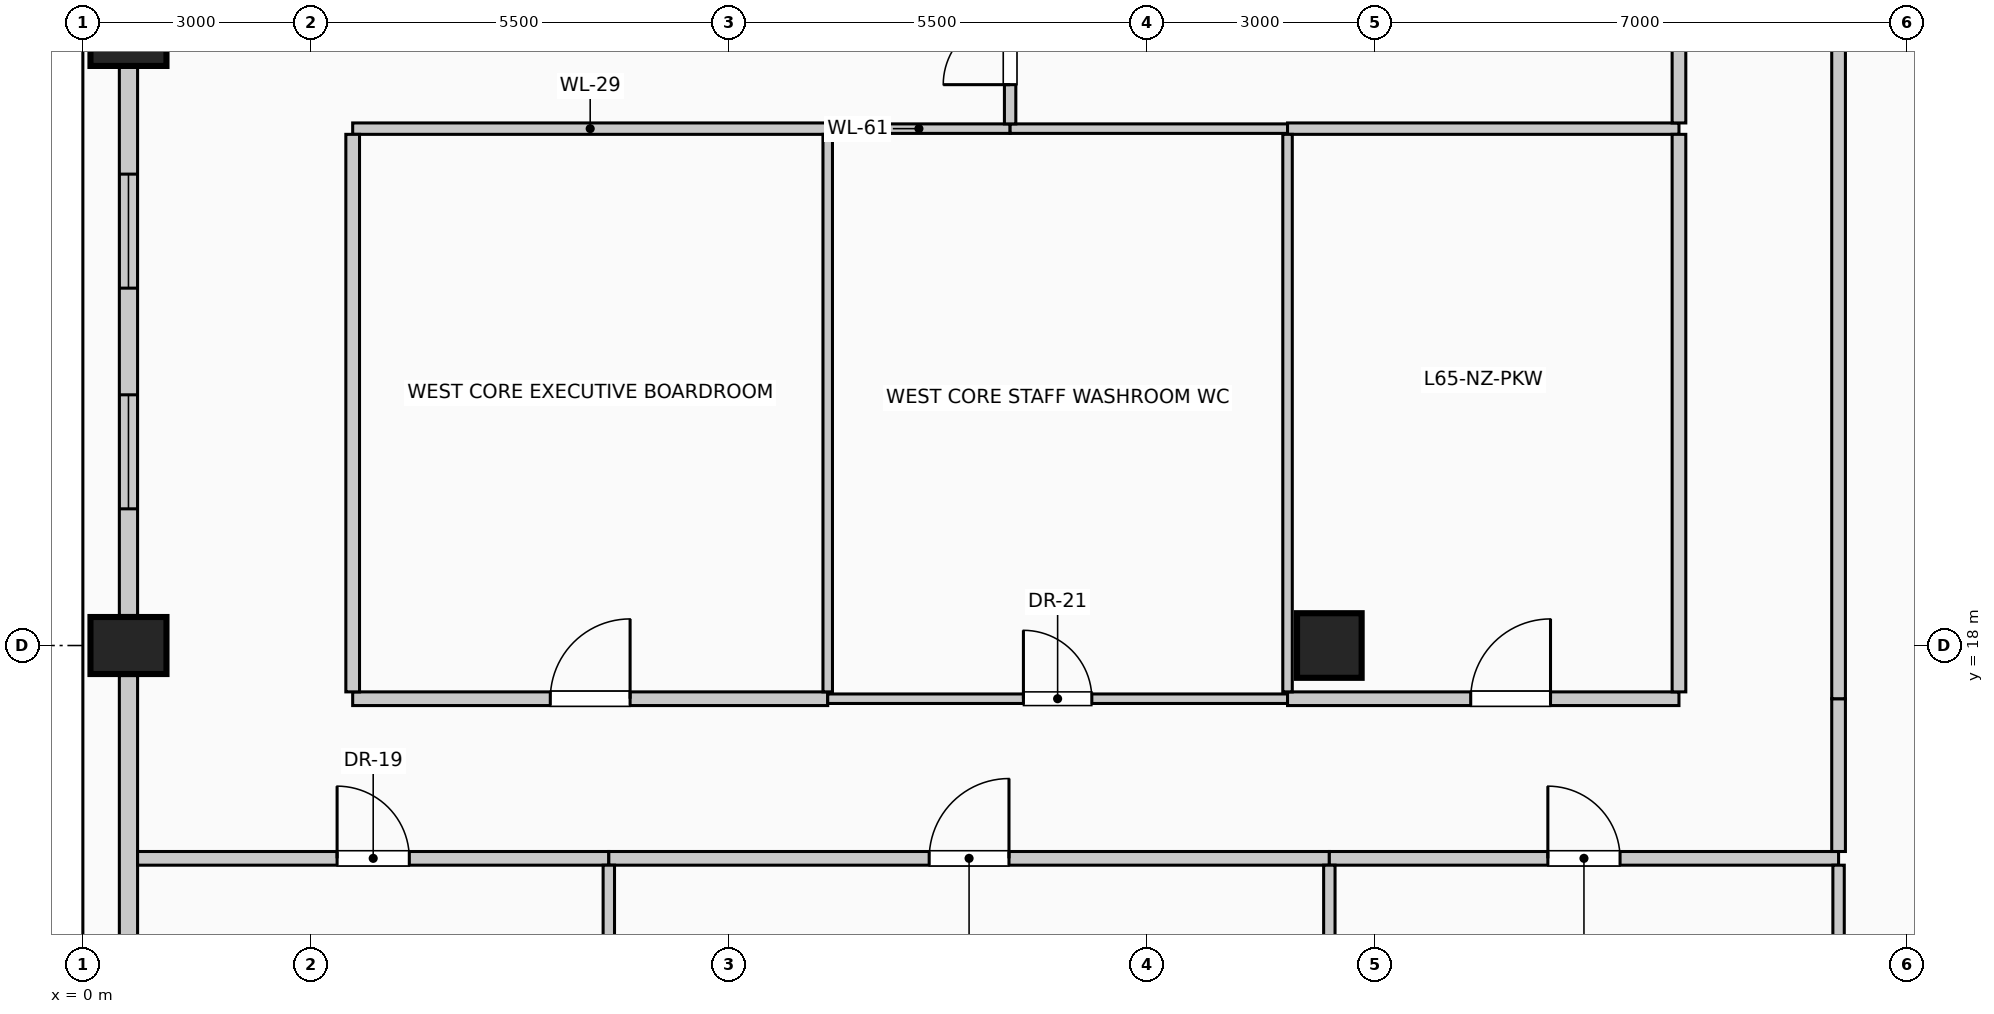
"""IFC4 building model, lengths in metres.
Left out: names, types, materials, properties, quantities, classifications, styles, units other than length and angle.
Written with IfcOpenShell. Run it as: python <this file> out.ifc"""

import sys

from ifc_helpers import new_model, si_unit, direction, frame, frame_2d, origin, origin_2d, place, context, subcontext, project, spatial, rectangle, circle, extrude, element, fill, save


model = new_model("IFC4")
c1 = context("Model", 3, precision=1e-05, world=origin(), true_north=direction((0.0, 1.0)))
c2 = subcontext(c1, "Body", "Model", "MODEL_VIEW")
j1 = project(units=[si_unit("LENGTHUNIT", "METRE"), si_unit("PLANEANGLEUNIT", "RADIAN")], contexts=[c1])
p1 = place(None, origin())
s1 = spatial("IfcSite", under=j1, at=p1, CompositionType="ELEMENT")
p2 = place(p1, origin())
s2 = spatial("IfcBuilding", under=s1, at=p2, CompositionType="ELEMENT")
p3 = place(p2, frame((0.0, 0.0, 268.6)))
s3 = spatial("IfcBuildingStorey", under=s2, at=p3, CompositionType="ELEMENT", Elevation=268.6)
for number, where, z_axis, x_axis in (
    (1, (0.6, 18.0, 0.0), (0.0, 0.0, 1.0), (0.0, 1.0, 0.0)),
    (2, (0.6, 26.0, 0.0), (0.0, 0.0, 1.0), (0.0, 1.0, 0.0)),
):
    element("IfcColumn", number, at=place(p3, frame(where, z_axis=z_axis, x_axis=x_axis)), inside=s3, PredefinedType="COLUMN", context=c2, shape_type="SweptSolid", body=[
        extrude(rectangle(XDim=0.75, YDim=1.0, at=origin_2d()), origin(), (0.0, 0.0, 1.0), 4.0),
    ])
p4 = place(p3, frame((16.4, 18.0, 0.0), z_axis=(0.0, 0.0, 1.0), x_axis=(1.0, 0.0, 0.0)))
e3 = element("IfcColumn", 3, at=p4, inside=s3, PredefinedType="COLUMN", context=c2, shape_type="SweptSolid", body=[
    extrude(circle(Radius=0.425, at=origin_2d()), origin(), (0.0, 0.0, 1.0), 4.0),
])
p5 = place(p3, frame((0.6, 10.395, 0.0), z_axis=(0.0, 0.0, 1.0), x_axis=(0.0, 1.0, 0.0)))
e4 = element("IfcWall", 4, at=p5, inside=s3, PredefinedType="SOLIDWALL", context=c2, shape_type="SweptSolid", body=[
    extrude(rectangle(XDim=7.21, YDim=0.24, at=frame_2d((3.605, 0.0))), origin(), (0.0, 0.0, 1.0), 3.0),
])
p6 = place(p5, frame((1.403, 0.0, 0.42)))
e5 = element("IfcOpeningElement", 5, at=p6, cuts=e4, PredefinedType="OPENING", context=c2, shape_type="SweptSolid", body=[
    extrude(rectangle(XDim=1.5, YDim=2.2, at=frame_2d((0.75, 1.1))), frame((0.0, 0.13, 0.0), z_axis=(0.0, -1.0, 0.0), x_axis=(1.0, 0.0, 0.0)), (0.0, 0.0, 1.0), 0.26),
])
p7 = place(p3, frame((0.6, 18.395, 0.0), z_axis=(0.0, 0.0, 1.0), x_axis=(0.0, 1.0, 0.0)))
e6 = element("IfcWall", 6, at=p7, inside=s3, PredefinedType="SOLIDWALL", context=c2, shape_type="SweptSolid", body=[
    extrude(rectangle(XDim=7.21, YDim=0.24, at=frame_2d((3.605, 0.0))), origin(), (0.0, 0.0, 1.0), 3.0),
])
p8 = place(p7, frame((1.403, 0.0, 0.42)))
e7 = element("IfcOpeningElement", 7, at=p8, cuts=e6, PredefinedType="OPENING", context=c2, shape_type="SweptSolid", body=[
    extrude(rectangle(XDim=1.5, YDim=2.2, at=frame_2d((0.75, 1.1))), frame((0.0, 0.13, 0.0), z_axis=(0.0, -1.0, 0.0), x_axis=(1.0, 0.0, 0.0)), (0.0, 0.0, 1.0), 0.26),
])
p9 = place(p7, frame((4.307, 0.0, 0.42)))
e8 = element("IfcOpeningElement", 8, at=p9, cuts=e6, PredefinedType="OPENING", context=c2, shape_type="SweptSolid", body=[
    extrude(rectangle(XDim=1.5, YDim=2.2, at=frame_2d((0.75, 1.1))), frame((0.0, 0.13, 0.0), z_axis=(0.0, -1.0, 0.0), x_axis=(1.0, 0.0, 0.0)), (0.0, 0.0, 1.0), 0.26),
])
p10 = place(p3, frame((0.72, 15.2, 0.0), z_axis=(0.0, 0.0, 1.0), x_axis=(1.0, 0.0, 0.0)))
e9 = element("IfcWall", 9, at=p10, inside=s3, PredefinedType="PARTITIONING", context=c2, shape_type="SweptSolid", body=[
    extrude(rectangle(XDim=6.2, YDim=0.18, at=frame_2d((3.1, 0.0))), origin(), (0.0, 0.0, 1.0), 3.75),
])
p11 = place(p10, frame((2.625, 0.0, 0.0)))
e10 = element("IfcOpeningElement", 10, at=p11, cuts=e9, PredefinedType="OPENING", context=c2, shape_type="SweptSolid", body=[
    extrude(rectangle(XDim=0.95, YDim=2.15, at=frame_2d((0.475, 1.075))), frame((0.0, 0.1, 0.0), z_axis=(0.0, -1.0, 0.0), x_axis=(1.0, 0.0, 0.0)), (0.0, 0.0, 1.0), 0.2),
])
p12 = place(p3, frame((6.92, 15.2, 0.0), z_axis=(0.0, 0.0, 1.0), x_axis=(1.0, 0.0, 0.0)))
e11 = element("IfcWall", 11, at=p12, inside=s3, PredefinedType="PARTITIONING", context=c2, shape_type="SweptSolid", body=[
    extrude(rectangle(XDim=9.48, YDim=0.18, at=frame_2d((4.74, 0.0))), origin(), (0.0, 0.0, 1.0), 3.75),
])
p13 = place(p12, frame((4.215, 0.0, 0.0)))
e12 = element("IfcOpeningElement", 12, at=p13, cuts=e11, PredefinedType="OPENING", context=c2, shape_type="SweptSolid", body=[
    extrude(rectangle(XDim=1.05, YDim=2.15, at=frame_2d((0.525, 1.075))), frame((0.0, 0.1, 0.0), z_axis=(0.0, -1.0, 0.0), x_axis=(1.0, 0.0, 0.0)), (0.0, 0.0, 1.0), 0.2),
])
p14 = place(p3, frame((16.4, 15.2, 0.0), z_axis=(0.0, 0.0, 1.0), x_axis=(1.0, 0.0, 0.0)))
e13 = element("IfcWall", 13, at=p14, inside=s3, PredefinedType="PARTITIONING", context=c2, shape_type="SweptSolid", body=[
    extrude(rectangle(XDim=6.7, YDim=0.18, at=frame_2d((3.35, 0.0))), origin(), (0.0, 0.0, 1.0), 3.75),
])
p15 = place(p14, frame((2.875, 0.0, 0.0)))
e14 = element("IfcOpeningElement", 14, at=p15, cuts=e13, PredefinedType="OPENING", context=c2, shape_type="SweptSolid", body=[
    extrude(rectangle(XDim=0.95, YDim=2.15, at=frame_2d((0.475, 1.075))), frame((0.0, 0.1, 0.0), z_axis=(0.0, -1.0, 0.0), x_axis=(1.0, 0.0, 0.0)), (0.0, 0.0, 1.0), 0.2),
])
p16 = place(p3, frame((3.55, 17.3, 0.0), z_axis=(0.0, 0.0, 1.0), x_axis=(1.0, 0.0, 0.0)))
e15 = element("IfcWall", 15, at=p16, inside=s3, PredefinedType="PARTITIONING", context=c2, shape_type="SweptSolid", body=[
    extrude(rectangle(XDim=6.25, YDim=0.18, at=frame_2d((3.125, 0.0))), origin(), (0.0, 0.0, 1.0), 3.75),
])
p17 = place(p16, frame((2.6, 0.0, 0.0)))
e16 = element("IfcOpeningElement", 16, at=p17, cuts=e15, PredefinedType="OPENING", context=c2, shape_type="SweptSolid", body=[
    extrude(rectangle(XDim=1.05, YDim=2.15, at=frame_2d((0.525, 1.075))), frame((0.0, 0.1, 0.0), z_axis=(0.0, -1.0, 0.0), x_axis=(1.0, 0.0, 0.0)), (0.0, 0.0, 1.0), 0.2),
])
p18 = place(p3, frame((9.8, 17.3, 0.0), z_axis=(0.0, 0.0, 1.0), x_axis=(1.0, 0.0, 0.0)))
e17 = element("IfcWall", 17, at=p18, inside=s3, PredefinedType="PARTITIONING", context=c2, shape_type="SweptSolid", body=[
    extrude(rectangle(XDim=6.05, YDim=0.125, at=frame_2d((3.025, 0.0))), origin(), (0.0, 0.0, 1.0), 3.75),
])
p19 = place(p18, frame((2.575, 0.0, 0.0)))
e18 = element("IfcOpeningElement", 18, at=p19, cuts=e17, PredefinedType="OPENING", context=c2, shape_type="SweptSolid", body=[
    extrude(rectangle(XDim=0.9, YDim=2.1, at=frame_2d((0.45, 1.05))), frame((0.0, 0.073, 0.0), z_axis=(0.0, -1.0, 0.0), x_axis=(1.0, 0.0, 0.0)), (0.0, 0.0, 1.0), 0.145),
])
p20 = place(p3, frame((15.85, 17.3, 0.0), z_axis=(0.0, 0.0, 1.0), x_axis=(1.0, 0.0, 0.0)))
e19 = element("IfcWall", 19, at=p20, inside=s3, PredefinedType="PARTITIONING", context=c2, shape_type="SweptSolid", body=[
    extrude(rectangle(XDim=5.15, YDim=0.18, at=frame_2d((2.575, 0.0))), origin(), (0.0, 0.0, 1.0), 3.75),
])
p21 = place(p20, frame((2.41, 0.0, 0.0)))
e20 = element("IfcOpeningElement", 20, at=p21, cuts=e19, PredefinedType="OPENING", context=c2, shape_type="SweptSolid", body=[
    extrude(rectangle(XDim=1.05, YDim=2.15, at=frame_2d((0.525, 1.075))), frame((0.0, 0.1, 0.0), z_axis=(0.0, -1.0, 0.0), x_axis=(1.0, 0.0, 0.0)), (0.0, 0.0, 1.0), 0.2),
])
p22 = place(p3, frame((3.55, 24.8, 0.0), z_axis=(0.0, 0.0, 1.0), x_axis=(1.0, 0.0, 0.0)))
e21 = element("IfcWall", 21, at=p22, inside=s3, PredefinedType="PARTITIONING", context=c2, shape_type="SweptSolid", body=[
    extrude(rectangle(XDim=6.25, YDim=0.15, at=frame_2d((3.125, 0.0))), origin(), (0.0, 0.0, 1.0), 3.75),
])
p23 = place(p3, frame((9.8, 24.8, 0.0), z_axis=(0.0, 0.0, 1.0), x_axis=(1.0, 0.0, 0.0)))
e22 = element("IfcWall", 22, at=p23, inside=s3, PredefinedType="PARTITIONING", context=c2, shape_type="SweptSolid", body=[
    extrude(rectangle(XDim=2.4, YDim=0.125, at=frame_2d((1.2, 0.0))), origin(), (0.0, 0.0, 1.0), 3.75),
])
p24 = place(p3, frame((12.2, 24.8, 0.0), z_axis=(0.0, 0.0, 1.0), x_axis=(1.0, 0.0, 0.0)))
e23 = element("IfcWall", 23, at=p24, inside=s3, PredefinedType="PARTITIONING", context=c2, shape_type="SweptSolid", body=[
    extrude(rectangle(XDim=3.65, YDim=0.125, at=frame_2d((1.825, 0.0))), origin(), (0.0, 0.0, 1.0), 3.75),
])
p25 = place(p3, frame((15.85, 24.8, 0.0), z_axis=(0.0, 0.0, 1.0), x_axis=(1.0, 0.0, 0.0)))
e24 = element("IfcWall", 24, at=p25, inside=s3, PredefinedType="PARTITIONING", context=c2, shape_type="SweptSolid", body=[
    extrude(rectangle(XDim=5.15, YDim=0.15, at=frame_2d((2.575, 0.0))), origin(), (0.0, 0.0, 1.0), 3.75),
])
p26 = place(p3, frame((3.55, 17.39, 0.0), z_axis=(0.0, 0.0, 1.0), x_axis=(0.0, 1.0, 0.0)))
e25 = element("IfcWall", 25, at=p26, inside=s3, PredefinedType="PARTITIONING", context=c2, shape_type="SweptSolid", body=[
    extrude(rectangle(XDim=7.335, YDim=0.18, at=frame_2d((3.667, 0.0))), origin(), (0.0, 0.0, 1.0), 3.75),
])
p27 = place(p3, frame((6.92, 0.72, 0.0), z_axis=(0.0, 0.0, 1.0), x_axis=(0.0, 1.0, 0.0)))
e26 = element("IfcWall", 26, at=p27, inside=s3, PredefinedType="PARTITIONING", context=c2, shape_type="SweptSolid", body=[
    extrude(rectangle(XDim=14.39, YDim=0.15, at=frame_2d((7.195, 0.0))), origin(), (0.0, 0.0, 1.0), 3.75),
])
p28 = place(p3, frame((9.8, 17.39, 0.0), z_axis=(0.0, 0.0, 1.0), x_axis=(0.0, 1.0, 0.0)))
e27 = element("IfcWall", 27, at=p28, inside=s3, PredefinedType="PARTITIONING", context=c2, shape_type="SweptSolid", body=[
    extrude(rectangle(XDim=7.335, YDim=0.125, at=frame_2d((3.667, 0.0))), origin(), (0.0, 0.0, 1.0), 3.75),
])
p29 = place(p3, frame((12.2, 24.863, 0.0), z_axis=(0.0, 0.0, 1.0), x_axis=(0.0, 1.0, 0.0)))
e28 = element("IfcWall", 28, at=p29, inside=s3, PredefinedType="PARTITIONING", context=c2, shape_type="SweptSolid", body=[
    extrude(rectangle(XDim=1.912, YDim=0.15, at=frame_2d((0.956, 0.0))), origin(), (0.0, 0.0, 1.0), 3.75),
])
p30 = place(p29, frame((0.516, 0.0, 0.0)))
e29 = element("IfcOpeningElement", 29, at=p30, cuts=e28, PredefinedType="OPENING", context=c2, shape_type="SweptSolid", body=[
    extrude(rectangle(XDim=0.88, YDim=2.1, at=frame_2d((0.44, 1.05))), frame((0.0, 0.085, 0.0), z_axis=(0.0, -1.0, 0.0), x_axis=(1.0, 0.0, 0.0)), (0.0, 0.0, 1.0), 0.17),
])
p31 = place(p3, frame((15.85, 17.39, 0.0), z_axis=(0.0, 0.0, 1.0), x_axis=(0.0, 1.0, 0.0)))
e30 = element("IfcWall", 30, at=p31, inside=s3, PredefinedType="PARTITIONING", context=c2, shape_type="SweptSolid", body=[
    extrude(rectangle(XDim=7.335, YDim=0.125, at=frame_2d((3.667, 0.0))), origin(), (0.0, 0.0, 1.0), 3.75),
])
p32 = place(p3, frame((16.4, 1.25, 0.0), z_axis=(0.0, 0.0, 1.0), x_axis=(0.0, 1.0, 0.0)))
e31 = element("IfcWall", 31, at=p32, inside=s3, PredefinedType="PARTITIONING", context=c2, shape_type="SweptSolid", body=[
    extrude(rectangle(XDim=13.86, YDim=0.15, at=frame_2d((6.93, 0.0))), origin(), (0.0, 0.0, 1.0), 3.195),
])
p33 = place(p3, frame((21.0, 17.39, 0.0), z_axis=(0.0, 0.0, 1.0), x_axis=(0.0, 1.0, 0.0)))
e32 = element("IfcWall", 32, at=p33, inside=s3, PredefinedType="PARTITIONING", context=c2, shape_type="SweptSolid", body=[
    extrude(rectangle(XDim=7.335, YDim=0.18, at=frame_2d((3.667, 0.0))), origin(), (0.0, 0.0, 1.0), 3.75),
])
p34 = place(p3, frame((21.0, 24.875, 0.0), z_axis=(0.0, 0.0, 1.0), x_axis=(0.0, 1.0, 0.0)))
e33 = element("IfcWall", 33, at=p34, inside=s3, PredefinedType="PARTITIONING", context=c2, shape_type="SweptSolid", body=[
    extrude(rectangle(XDim=1.9, YDim=0.18, at=frame_2d((0.95, 0.0))), origin(), (0.0, 0.0, 1.0), 3.75),
])
p35 = place(p3, frame((23.1, 0.72, 0.0), z_axis=(0.0, 0.0, 1.0), x_axis=(0.0, 1.0, 0.0)))
e34 = element("IfcWall", 34, at=p35, inside=s3, PredefinedType="PARTITIONING", context=c2, shape_type="SweptSolid", body=[
    extrude(rectangle(XDim=14.39, YDim=0.15, at=frame_2d((7.195, 0.0))), origin(), (0.0, 0.0, 1.0), 3.75),
])
p36 = place(p3, frame((23.1, 15.29, 0.0), z_axis=(0.0, 0.0, 1.0), x_axis=(0.0, 1.0, 0.0)))
e35 = element("IfcWall", 35, at=p36, inside=s3, PredefinedType="PARTITIONING", context=c2, shape_type="SweptSolid", body=[
    extrude(rectangle(XDim=2.01, YDim=0.18, at=frame_2d((1.005, 0.0))), origin(), (0.0, 0.0, 1.0), 3.75),
])
p37 = place(p3, frame((23.1, 17.3, 0.0), z_axis=(0.0, 0.0, 1.0), x_axis=(0.0, 1.0, 0.0)))
e36 = element("IfcWall", 36, at=p37, inside=s3, PredefinedType="PARTITIONING", context=c2, shape_type="SweptSolid", body=[
    extrude(rectangle(XDim=9.51, YDim=0.18, at=frame_2d((4.755, 0.0))), origin(), (0.0, 0.0, 1.0), 3.75),
])
p38 = place(p8, origin())
e37 = element("IfcWindow", 37, at=p38, inside=s3, PartitioningType="SINGLE_PANEL", PredefinedType="WINDOW", context=c2, shape_type="SweptSolid", body=[
    extrude(rectangle(XDim=1.5, YDim=2.2, at=frame_2d((0.75, 1.1))), frame((0.0, 0.03, 0.0), z_axis=(0.0, -1.0, 0.0), x_axis=(1.0, 0.0, 0.0)), (0.0, 0.0, 1.0), 0.06),
])
fill(e7, e37)
p39 = place(p9, origin())
e38 = element("IfcWindow", 38, at=p39, inside=s3, PartitioningType="SINGLE_PANEL", PredefinedType="WINDOW", context=c2, shape_type="SweptSolid", body=[
    extrude(rectangle(XDim=1.5, YDim=2.2, at=frame_2d((0.75, 1.1))), frame((0.0, 0.03, 0.0), z_axis=(0.0, -1.0, 0.0), x_axis=(1.0, 0.0, 0.0)), (0.0, 0.0, 1.0), 0.06),
])
fill(e8, e38)
p40 = place(p11, origin())
e39 = element("IfcDoor", 39, at=p40, inside=s3, OperationType="SINGLE_SWING_LEFT", PredefinedType="DOOR", context=c2, shape_type="SweptSolid", body=[
    extrude(rectangle(XDim=0.95, YDim=2.15, at=frame_2d((0.475, 1.075))), frame((0.0, 0.025, 0.0), z_axis=(0.0, -1.0, 0.0), x_axis=(1.0, 0.0, 0.0)), (0.0, 0.0, 1.0), 0.05),
])
fill(e10, e39)
p41 = place(p13, origin())
e40 = element("IfcDoor", 40, at=p41, inside=s3, OperationType="SINGLE_SWING_RIGHT", PredefinedType="DOOR", context=c2, shape_type="SweptSolid", body=[
    extrude(rectangle(XDim=1.05, YDim=2.15, at=frame_2d((0.525, 1.075))), frame((0.0, 0.025, 0.0), z_axis=(0.0, -1.0, 0.0), x_axis=(1.0, 0.0, 0.0)), (0.0, 0.0, 1.0), 0.05),
])
fill(e12, e40)
p42 = place(p15, origin())
e41 = element("IfcDoor", 41, at=p42, inside=s3, OperationType="SINGLE_SWING_LEFT", PredefinedType="DOOR", context=c2, shape_type="SweptSolid", body=[
    extrude(rectangle(XDim=0.95, YDim=2.15, at=frame_2d((0.475, 1.075))), frame((0.0, 0.025, 0.0), z_axis=(0.0, -1.0, 0.0), x_axis=(1.0, 0.0, 0.0)), (0.0, 0.0, 1.0), 0.05),
])
fill(e14, e41)
p43 = place(p17, origin())
e42 = element("IfcDoor", 42, at=p43, inside=s3, OperationType="SINGLE_SWING_RIGHT", PredefinedType="DOOR", context=c2, shape_type="SweptSolid", body=[
    extrude(rectangle(XDim=1.05, YDim=2.15, at=frame_2d((0.525, 1.075))), frame((0.0, 0.025, 0.0), z_axis=(0.0, -1.0, 0.0), x_axis=(1.0, 0.0, 0.0)), (0.0, 0.0, 1.0), 0.05),
])
fill(e16, e42)
p44 = place(p19, origin())
e43 = element("IfcDoor", 43, at=p44, inside=s3, OperationType="SINGLE_SWING_LEFT", PredefinedType="DOOR", context=c2, shape_type="SweptSolid", body=[
    extrude(rectangle(XDim=0.9, YDim=2.1, at=frame_2d((0.45, 1.05))), frame((0.0, 0.025, 0.0), z_axis=(0.0, -1.0, 0.0), x_axis=(1.0, 0.0, 0.0)), (0.0, 0.0, 1.0), 0.05),
])
fill(e18, e43)
p45 = place(p21, origin())
e44 = element("IfcDoor", 44, at=p45, inside=s3, OperationType="SINGLE_SWING_RIGHT", PredefinedType="DOOR", context=c2, shape_type="SweptSolid", body=[
    extrude(rectangle(XDim=1.05, YDim=2.15, at=frame_2d((0.525, 1.075))), frame((0.0, 0.025, 0.0), z_axis=(0.0, -1.0, 0.0), x_axis=(1.0, 0.0, 0.0)), (0.0, 0.0, 1.0), 0.05),
])
fill(e20, e44)
p46 = place(p30, origin())
e45 = element("IfcDoor", 45, at=p46, inside=s3, OperationType="SINGLE_SWING_LEFT", PredefinedType="DOOR", context=c2, shape_type="SweptSolid", body=[
    extrude(rectangle(XDim=0.88, YDim=2.1, at=frame_2d((0.44, 1.05))), frame((0.0, 0.025, 0.0), z_axis=(0.0, -1.0, 0.0), x_axis=(1.0, 0.0, 0.0)), (0.0, 0.0, 1.0), 0.05),
])
fill(e29, e45)
save(model, sys.argv[1])
